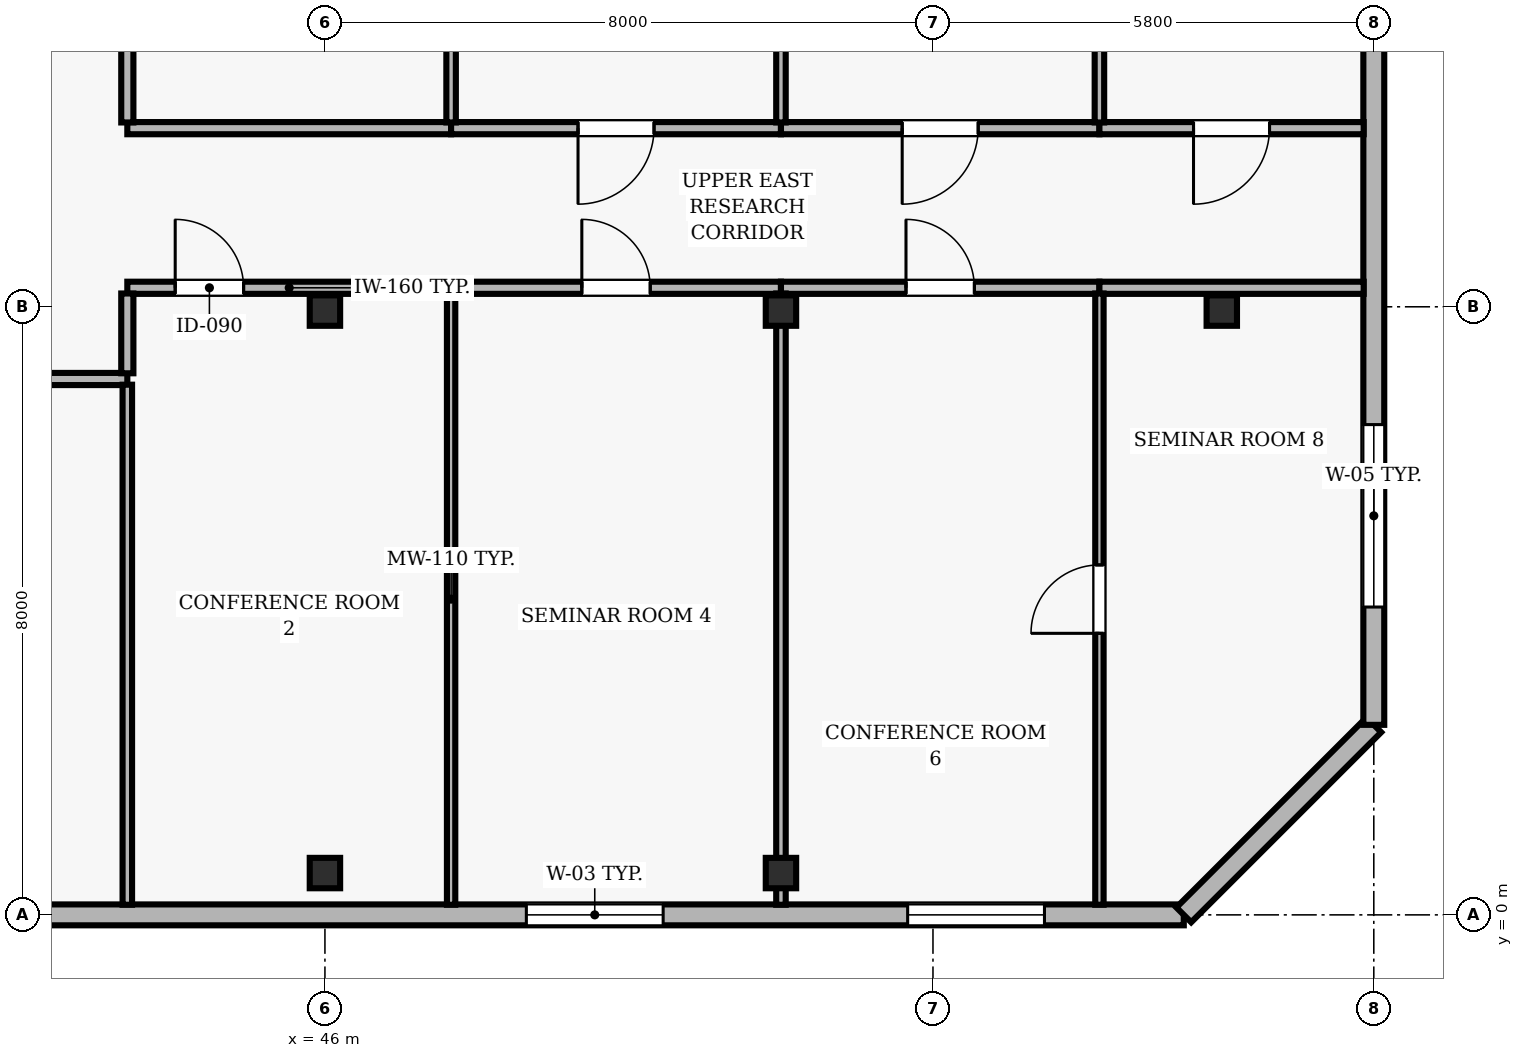
"""IFC4 building model, lengths in metres.
Left out: names, types, materials, properties, quantities, classifications, styles, units other than length and angle.
Written with IfcOpenShell. Run it as: python <this file> out.ifc"""

import sys

from ifc_helpers import new_model, si_unit, direction, frame, frame_2d, origin, origin_2d, place, context, subcontext, project, spatial, rectangle, hollow_rectangle, extrude, element, fill, save


model = new_model("IFC4")
c1 = context("Model", 3, precision=1e-05, world=origin(), true_north=direction((0.0, 1.0)))
c2 = subcontext(c1, "Body", "Model", "MODEL_VIEW")
j1 = project(units=[si_unit("LENGTHUNIT", "METRE"), si_unit("PLANEANGLEUNIT", "RADIAN")], contexts=[c1])
p1 = place(None, origin())
s1 = spatial("IfcSite", under=j1, at=p1, CompositionType="ELEMENT")
p2 = place(p1, origin())
s2 = spatial("IfcBuilding", under=s1, at=p2, CompositionType="ELEMENT")
p3 = place(p2, frame((0.0, 0.0, 302.8)))
s3 = spatial("IfcBuildingStorey", under=s2, at=p3, CompositionType="ELEMENT", Elevation=302.8)
for number, where, z_axis, x_axis in (
    (1, (46.0, 0.55, 0.0), (0.0, 0.0, 1.0), (1.0, 0.0, 0.0)),
    (2, (46.0, 7.95, 0.0), (0.0, 0.0, 1.0), (1.0, 0.0, 0.0)),
    (3, (52.0, 0.55, 0.0), (0.0, 0.0, 1.0), (1.0, 0.0, 0.0)),
    (4, (52.0, 7.95, 0.0), (0.0, 0.0, 1.0), (1.0, 0.0, 0.0)),
    (5, (57.8, 7.95, 0.0), (0.0, 0.0, 1.0), (1.0, 0.0, 0.0)),
):
    element("IfcColumn", number, at=place(p3, frame(where, z_axis=z_axis, x_axis=x_axis)), inside=s3, PredefinedType="COLUMN", context=c2, shape_type="SweptSolid", body=[
        extrude(hollow_rectangle(XDim=0.4, YDim=0.4, WallThickness=0.02, at=origin_2d()), origin(), (0.0, 0.0, 1.0), 3.9),
    ])
p4 = place(p3, frame((24.5, 0.0, 0.0), z_axis=(0.0, 0.0, 1.0), x_axis=(1.0, 0.0, 0.0)))
e6 = element("IfcWall", 6, at=p4, inside=s3, PredefinedType="SOLIDWALL", context=c2, shape_type="SweptSolid", body=[
    extrude(rectangle(XDim=32.8, YDim=0.275, at=frame_2d((16.4, 0.0))), origin(), (0.0, 0.0, 1.0), 3.64),
])
p5 = place(p4, frame((1.833, 0.0, 0.9)))
e7 = element("IfcOpeningElement", 7, at=p5, cuts=e6, PredefinedType="OPENING", context=c2, shape_type="SweptSolid", body=[
    extrude(rectangle(XDim=1.8, YDim=1.6, at=frame_2d((0.9, 0.8))), frame((0.0, 0.147, 0.0), z_axis=(0.0, -1.0, 0.0), x_axis=(1.0, 0.0, 0.0)), (0.0, 0.0, 1.0), 0.295),
])
p6 = place(p4, frame((8.2, 0.0, 0.9)))
e8 = element("IfcOpeningElement", 8, at=p6, cuts=e6, PredefinedType="OPENING", context=c2, shape_type="SweptSolid", body=[
    extrude(rectangle(XDim=1.8, YDim=1.6, at=frame_2d((0.9, 0.8))), frame((0.0, 0.147, 0.0), z_axis=(0.0, -1.0, 0.0), x_axis=(1.0, 0.0, 0.0)), (0.0, 0.0, 1.0), 0.295),
])
p7 = place(p4, frame((24.15, 0.0, 0.9)))
e9 = element("IfcOpeningElement", 9, at=p7, cuts=e6, PredefinedType="OPENING", context=c2, shape_type="SweptSolid", body=[
    extrude(rectangle(XDim=1.8, YDim=1.6, at=frame_2d((0.9, 0.8))), frame((0.0, 0.147, 0.0), z_axis=(0.0, -1.0, 0.0), x_axis=(1.0, 0.0, 0.0)), (0.0, 0.0, 1.0), 0.295),
])
p8 = place(p4, frame((29.167, 0.0, 0.9)))
e10 = element("IfcOpeningElement", 10, at=p8, cuts=e6, PredefinedType="OPENING", context=c2, shape_type="SweptSolid", body=[
    extrude(rectangle(XDim=1.8, YDim=1.6, at=frame_2d((0.9, 0.8))), frame((0.0, 0.147, 0.0), z_axis=(0.0, -1.0, 0.0), x_axis=(1.0, 0.0, 0.0)), (0.0, 0.0, 1.0), 0.295),
])
p9 = place(p3, frame((57.3, 0.0, 0.0), z_axis=(0.0, 0.0, 1.0), x_axis=(0.707106781187, 0.707106781187, 0.0)))
e11 = element("IfcWall", 11, at=p9, inside=s3, PredefinedType="SOLIDWALL", context=c2, shape_type="SweptSolid", body=[
    extrude(rectangle(XDim=3.536, YDim=0.275, at=frame_2d((1.768, 0.0))), origin(), (0.0, 0.0, 1.0), 3.64),
])
p10 = place(p3, frame((59.8, 2.5, 0.0), z_axis=(0.0, 0.0, 1.0), x_axis=(0.0, 1.0, 0.0)))
e12 = element("IfcWall", 12, at=p10, inside=s3, PredefinedType="SOLIDWALL", context=c2, shape_type="SweptSolid", body=[
    extrude(rectangle(XDim=11.0, YDim=0.275, at=frame_2d((5.5, 0.0))), origin(), (0.0, 0.0, 1.0), 3.64),
])
p11 = place(p10, frame((1.55, 0.0, 0.9)))
e13 = element("IfcOpeningElement", 13, at=p11, cuts=e12, PredefinedType="OPENING", context=c2, shape_type="SweptSolid", body=[
    extrude(rectangle(XDim=2.4, YDim=1.6, at=frame_2d((1.2, 0.8))), frame((0.0, 0.147, 0.0), z_axis=(0.0, -1.0, 0.0), x_axis=(1.0, 0.0, 0.0)), (0.0, 0.0, 1.0), 0.295),
])
p12 = place(p3, frame((38.05, 7.05, 0.0), z_axis=(0.0, 0.0, 1.0), x_axis=(1.0, 0.0, 0.0)))
e14 = element("IfcWall", 14, at=p12, inside=s3, PredefinedType="PARTITIONING", context=c2, shape_type="SweptSolid", body=[
    extrude(rectangle(XDim=5.35, YDim=0.16, at=frame_2d((2.675, 0.0))), origin(), (0.0, 0.0, 1.0), 3.64),
])
p13 = place(p12, frame((2.175, 0.0, 0.0)))
e15 = element("IfcOpeningElement", 15, at=p13, cuts=e14, PredefinedType="OPENING", context=c2, shape_type="SweptSolid", body=[
    extrude(rectangle(XDim=1.0, YDim=2.1, at=frame_2d((0.5, 1.05))), frame((0.0, 0.09, 0.0), z_axis=(0.0, -1.0, 0.0), x_axis=(1.0, 0.0, 0.0)), (0.0, 0.0, 1.0), 0.18),
])
p14 = place(p3, frame((43.4, 8.25, 0.0), z_axis=(0.0, 0.0, 1.0), x_axis=(1.0, 0.0, 0.0)))
e16 = element("IfcWall", 16, at=p14, inside=s3, PredefinedType="PARTITIONING", context=c2, shape_type="SweptSolid", body=[
    extrude(rectangle(XDim=4.26, YDim=0.16, at=frame_2d((2.13, 0.0))), origin(), (0.0, 0.0, 1.0), 3.171),
])
p15 = place(p14, frame((0.63, 0.0, 0.0)))
e17 = element("IfcOpeningElement", 17, at=p15, cuts=e16, PredefinedType="OPENING", context=c2, shape_type="SweptSolid", body=[
    extrude(rectangle(XDim=0.9, YDim=2.1, at=frame_2d((0.45, 1.05))), frame((0.0, 0.09, 0.0), z_axis=(0.0, -1.0, 0.0), x_axis=(1.0, 0.0, 0.0)), (0.0, 0.0, 1.0), 0.18),
])
p16 = place(p3, frame((47.66, 8.25, 0.0), z_axis=(0.0, 0.0, 1.0), x_axis=(1.0, 0.0, 0.0)))
e18 = element("IfcWall", 18, at=p16, inside=s3, PredefinedType="PARTITIONING", context=c2, shape_type="SweptSolid", body=[
    extrude(rectangle(XDim=4.34, YDim=0.16, at=frame_2d((2.17, 0.0))), origin(), (0.0, 0.0, 1.0), 3.171),
])
p17 = place(p16, frame((1.72, 0.0, 0.0)))
e19 = element("IfcOpeningElement", 19, at=p17, cuts=e18, PredefinedType="OPENING", context=c2, shape_type="SweptSolid", body=[
    extrude(rectangle(XDim=0.9, YDim=2.1, at=frame_2d((0.45, 1.05))), frame((0.0, 0.09, 0.0), z_axis=(0.0, -1.0, 0.0), x_axis=(1.0, 0.0, 0.0)), (0.0, 0.0, 1.0), 0.18),
])
p18 = place(p3, frame((47.66, 10.35, 0.0), z_axis=(0.0, 0.0, 1.0), x_axis=(-1.0, 0.0, 0.0)))
e20 = element("IfcWall", 20, at=p18, inside=s3, PredefinedType="PARTITIONING", context=c2, shape_type="SweptSolid", body=[
    extrude(rectangle(XDim=4.26, YDim=0.16, at=frame_2d((2.13, 0.0))), origin(), (0.0, 0.0, 1.0), 3.322),
])
p19 = place(p3, frame((52.0, 8.25, 0.0), z_axis=(0.0, 0.0, 1.0), x_axis=(1.0, 0.0, 0.0)))
e21 = element("IfcWall", 21, at=p19, inside=s3, PredefinedType="PARTITIONING", context=c2, shape_type="SweptSolid", body=[
    extrude(rectangle(XDim=4.19, YDim=0.16, at=frame_2d((2.095, 0.0))), origin(), (0.0, 0.0, 1.0), 3.171),
])
p20 = place(p19, frame((1.645, 0.0, 0.0)))
e22 = element("IfcOpeningElement", 22, at=p20, cuts=e21, PredefinedType="OPENING", context=c2, shape_type="SweptSolid", body=[
    extrude(rectangle(XDim=0.9, YDim=2.1, at=frame_2d((0.45, 1.05))), frame((0.0, 0.09, 0.0), z_axis=(0.0, -1.0, 0.0), x_axis=(1.0, 0.0, 0.0)), (0.0, 0.0, 1.0), 0.18),
])
p21 = place(p3, frame((52.0, 10.35, 0.0), z_axis=(0.0, 0.0, 1.0), x_axis=(-1.0, 0.0, 0.0)))
e23 = element("IfcWall", 23, at=p21, inside=s3, PredefinedType="PARTITIONING", context=c2, shape_type="SweptSolid", body=[
    extrude(rectangle(XDim=4.34, YDim=0.16, at=frame_2d((2.17, 0.0))), origin(), (0.0, 0.0, 1.0), 3.322),
])
p22 = place(p21, frame((1.67, 0.0, 0.0)))
e24 = element("IfcOpeningElement", 24, at=p22, cuts=e23, PredefinedType="OPENING", context=c2, shape_type="SweptSolid", body=[
    extrude(rectangle(XDim=1.0, YDim=2.1, at=frame_2d((0.5, 1.05))), frame((0.0, 0.09, 0.0), z_axis=(0.0, -1.0, 0.0), x_axis=(1.0, 0.0, 0.0)), (0.0, 0.0, 1.0), 0.18),
])
p23 = place(p3, frame((56.19, 8.25, 0.0), z_axis=(0.0, 0.0, 1.0), x_axis=(1.0, 0.0, 0.0)))
e25 = element("IfcWall", 25, at=p23, inside=s3, PredefinedType="PARTITIONING", context=c2, shape_type="SweptSolid", body=[
    extrude(rectangle(XDim=3.477, YDim=0.16, at=frame_2d((1.739, 0.0))), origin(), (0.0, 0.0, 1.0), 3.171),
])
p24 = place(p3, frame((56.19, 10.35, 0.0), z_axis=(0.0, 0.0, 1.0), x_axis=(-1.0, 0.0, 0.0)))
e26 = element("IfcWall", 26, at=p24, inside=s3, PredefinedType="PARTITIONING", context=c2, shape_type="SweptSolid", body=[
    extrude(rectangle(XDim=4.19, YDim=0.16, at=frame_2d((2.095, 0.0))), origin(), (0.0, 0.0, 1.0), 3.322),
])
p25 = place(p24, frame((1.595, 0.0, 0.0)))
e27 = element("IfcOpeningElement", 27, at=p25, cuts=e26, PredefinedType="OPENING", context=c2, shape_type="SweptSolid", body=[
    extrude(rectangle(XDim=1.0, YDim=2.1, at=frame_2d((0.5, 1.05))), frame((0.0, 0.09, 0.0), z_axis=(0.0, -1.0, 0.0), x_axis=(1.0, 0.0, 0.0)), (0.0, 0.0, 1.0), 0.18),
])
p26 = place(p3, frame((59.667, 10.35, 0.0), z_axis=(0.0, 0.0, 1.0), x_axis=(-1.0, 0.0, 0.0)))
e28 = element("IfcWall", 28, at=p26, inside=s3, PredefinedType="PARTITIONING", context=c2, shape_type="SweptSolid", body=[
    extrude(rectangle(XDim=3.477, YDim=0.16, at=frame_2d((1.739, 0.0))), origin(), (0.0, 0.0, 1.0), 3.322),
])
p27 = place(p26, frame((1.239, 0.0, 0.0)))
e29 = element("IfcOpeningElement", 29, at=p27, cuts=e28, PredefinedType="OPENING", context=c2, shape_type="SweptSolid", body=[
    extrude(rectangle(XDim=1.0, YDim=2.1, at=frame_2d((0.5, 1.05))), frame((0.0, 0.09, 0.0), z_axis=(0.0, -1.0, 0.0), x_axis=(1.0, 0.0, 0.0)), (0.0, 0.0, 1.0), 0.18),
])
p28 = place(p3, frame((43.4, 0.133, 0.0), z_axis=(0.0, 0.0, 1.0), x_axis=(0.0, 1.0, 0.0)))
e30 = element("IfcWall", 30, at=p28, inside=s3, PredefinedType="PARTITIONING", context=c2, shape_type="SweptSolid", body=[
    extrude(rectangle(XDim=6.842, YDim=0.125, at=frame_2d((3.421, 0.0))), origin(), (0.0, 0.0, 1.0), 3.64),
])
p29 = place(p3, frame((43.4, 7.125, 0.0), z_axis=(0.0, 0.0, 1.0), x_axis=(0.0, 1.0, 0.0)))
e31 = element("IfcWall", 31, at=p29, inside=s3, PredefinedType="PARTITIONING", context=c2, shape_type="SweptSolid", body=[
    extrude(rectangle(XDim=1.05, YDim=0.16, at=frame_2d((0.525, 0.0))), origin(), (0.0, 0.0, 1.0), 3.64),
])
p30 = place(p3, frame((43.4, 10.425, 0.0), z_axis=(0.0, 0.0, 1.0), x_axis=(0.0, 1.0, 0.0)))
e32 = element("IfcWall", 32, at=p30, inside=s3, PredefinedType="PARTITIONING", context=c2, shape_type="SweptSolid", body=[
    extrude(rectangle(XDim=5.5, YDim=0.16, at=frame_2d((2.75, 0.0))), origin(), (0.0, 0.0, 1.0), 3.64),
])
p31 = place(p30, frame((2.25, 0.0, 0.0)))
e33 = element("IfcOpeningElement", 33, at=p31, cuts=e32, PredefinedType="OPENING", context=c2, shape_type="SweptSolid", body=[
    extrude(rectangle(XDim=1.0, YDim=2.1, at=frame_2d((0.5, 1.05))), frame((0.0, 0.09, 0.0), z_axis=(0.0, -1.0, 0.0), x_axis=(1.0, 0.0, 0.0)), (0.0, 0.0, 1.0), 0.18),
])
p32 = place(p3, frame((47.66, 0.133, 0.0), z_axis=(0.0, 0.0, 1.0), x_axis=(0.0, 1.0, 0.0)))
e34 = element("IfcWall", 34, at=p32, inside=s3, PredefinedType="MOVABLE", context=c2, shape_type="SweptSolid", body=[
    extrude(rectangle(XDim=8.042, YDim=0.11, at=frame_2d((4.021, 0.0))), origin(), (0.0, 0.0, 1.0), 3.64),
])
p33 = place(p3, frame((47.66, 10.425, 0.0), z_axis=(0.0, 0.0, 1.0), x_axis=(0.0, 1.0, 0.0)))
e35 = element("IfcWall", 35, at=p33, inside=s3, PredefinedType="PARTITIONING", context=c2, shape_type="SweptSolid", body=[
    extrude(rectangle(XDim=5.442, YDim=0.125, at=frame_2d((2.721, 0.0))), origin(), (0.0, 0.0, 1.0), 3.64),
])
p34 = place(p3, frame((52.0, 0.133, 0.0), z_axis=(0.0, 0.0, 1.0), x_axis=(0.0, 1.0, 0.0)))
e36 = element("IfcWall", 36, at=p34, inside=s3, PredefinedType="PARTITIONING", context=c2, shape_type="SweptSolid", body=[
    extrude(rectangle(XDim=8.042, YDim=0.125, at=frame_2d((4.021, 0.0))), origin(), (0.0, 0.0, 1.0), 3.171),
])
p35 = place(p3, frame((52.0, 10.425, 0.0), z_axis=(0.0, 0.0, 1.0), x_axis=(0.0, 1.0, 0.0)))
e37 = element("IfcWall", 37, at=p35, inside=s3, PredefinedType="PARTITIONING", context=c2, shape_type="SweptSolid", body=[
    extrude(rectangle(XDim=5.442, YDim=0.125, at=frame_2d((2.721, 0.0))), origin(), (0.0, 0.0, 1.0), 3.171),
])
p36 = place(p3, frame((56.19, 0.133, 0.0), z_axis=(0.0, 0.0, 1.0), x_axis=(0.0, 1.0, 0.0)))
e38 = element("IfcWall", 38, at=p36, inside=s3, PredefinedType="MOVABLE", context=c2, shape_type="SweptSolid", body=[
    extrude(rectangle(XDim=8.042, YDim=0.11, at=frame_2d((4.021, 0.0))), origin(), (0.0, 0.0, 1.0), 3.64),
])
p37 = place(p36, frame((3.571, 0.0, 0.0)))
e39 = element("IfcOpeningElement", 39, at=p37, cuts=e38, PredefinedType="OPENING", context=c2, shape_type="SweptSolid", body=[
    extrude(rectangle(XDim=0.9, YDim=2.1, at=frame_2d((0.45, 1.05))), frame((0.0, 0.065, 0.0), z_axis=(0.0, -1.0, 0.0), x_axis=(1.0, 0.0, 0.0)), (0.0, 0.0, 1.0), 0.13),
])
p38 = place(p3, frame((56.19, 10.425, 0.0), z_axis=(0.0, 0.0, 1.0), x_axis=(0.0, 1.0, 0.0)))
e40 = element("IfcWall", 40, at=p38, inside=s3, PredefinedType="PARTITIONING", context=c2, shape_type="SweptSolid", body=[
    extrude(rectangle(XDim=5.442, YDim=0.125, at=frame_2d((2.721, 0.0))), origin(), (0.0, 0.0, 1.0), 3.64),
])
p39 = place(p7, origin())
e41 = element("IfcWindow", 41, at=p39, inside=s3, PartitioningType="SINGLE_PANEL", PredefinedType="WINDOW", context=c2, shape_type="SweptSolid", body=[
    extrude(rectangle(XDim=1.8, YDim=1.6, at=frame_2d((0.9, 0.8))), frame((0.0, 0.03, 0.0), z_axis=(0.0, -1.0, 0.0), x_axis=(1.0, 0.0, 0.0)), (0.0, 0.0, 1.0), 0.06),
])
fill(e9, e41)
p40 = place(p8, origin())
e42 = element("IfcWindow", 42, at=p40, inside=s3, PartitioningType="SINGLE_PANEL", PredefinedType="WINDOW", context=c2, shape_type="SweptSolid", body=[
    extrude(rectangle(XDim=1.8, YDim=1.6, at=frame_2d((0.9, 0.8))), frame((0.0, 0.03, 0.0), z_axis=(0.0, -1.0, 0.0), x_axis=(1.0, 0.0, 0.0)), (0.0, 0.0, 1.0), 0.06),
])
fill(e10, e42)
p41 = place(p11, origin())
e43 = element("IfcWindow", 43, at=p41, inside=s3, PartitioningType="SINGLE_PANEL", PredefinedType="WINDOW", context=c2, shape_type="SweptSolid", body=[
    extrude(rectangle(XDim=2.4, YDim=1.6, at=frame_2d((1.2, 0.8))), frame((0.0, 0.03, 0.0), z_axis=(0.0, -1.0, 0.0), x_axis=(1.0, 0.0, 0.0)), (0.0, 0.0, 1.0), 0.06),
])
fill(e13, e43)
p42 = place(p15, origin())
e44 = element("IfcDoor", 44, at=p42, inside=s3, OperationType="SINGLE_SWING_LEFT", PredefinedType="DOOR", context=c2, shape_type="SweptSolid", body=[
    extrude(rectangle(XDim=0.9, YDim=2.1, at=frame_2d((0.45, 1.05))), frame((0.0, 0.025, 0.0), z_axis=(0.0, -1.0, 0.0), x_axis=(1.0, 0.0, 0.0)), (0.0, 0.0, 1.0), 0.05),
])
fill(e17, e44)
p43 = place(p17, origin())
e45 = element("IfcDoor", 45, at=p43, inside=s3, OperationType="SINGLE_SWING_LEFT", PredefinedType="DOOR", context=c2, shape_type="SweptSolid", body=[
    extrude(rectangle(XDim=0.9, YDim=2.1, at=frame_2d((0.45, 1.05))), frame((0.0, 0.025, 0.0), z_axis=(0.0, -1.0, 0.0), x_axis=(1.0, 0.0, 0.0)), (0.0, 0.0, 1.0), 0.05),
])
fill(e19, e45)
p44 = place(p22, origin())
e46 = element("IfcDoor", 46, at=p44, inside=s3, OperationType="SINGLE_SWING_RIGHT", PredefinedType="DOOR", context=c2, shape_type="SweptSolid", body=[
    extrude(rectangle(XDim=1.0, YDim=2.1, at=frame_2d((0.5, 1.05))), frame((0.0, 0.025, 0.0), z_axis=(0.0, -1.0, 0.0), x_axis=(1.0, 0.0, 0.0)), (0.0, 0.0, 1.0), 0.05),
])
fill(e24, e46)
p45 = place(p20, origin())
e47 = element("IfcDoor", 47, at=p45, inside=s3, OperationType="SINGLE_SWING_LEFT", PredefinedType="DOOR", context=c2, shape_type="SweptSolid", body=[
    extrude(rectangle(XDim=0.9, YDim=2.1, at=frame_2d((0.45, 1.05))), frame((0.0, 0.025, 0.0), z_axis=(0.0, -1.0, 0.0), x_axis=(1.0, 0.0, 0.0)), (0.0, 0.0, 1.0), 0.05),
])
fill(e22, e47)
p46 = place(p25, origin())
e48 = element("IfcDoor", 48, at=p46, inside=s3, OperationType="SINGLE_SWING_RIGHT", PredefinedType="DOOR", context=c2, shape_type="SweptSolid", body=[
    extrude(rectangle(XDim=1.0, YDim=2.1, at=frame_2d((0.5, 1.05))), frame((0.0, 0.025, 0.0), z_axis=(0.0, -1.0, 0.0), x_axis=(1.0, 0.0, 0.0)), (0.0, 0.0, 1.0), 0.05),
])
fill(e27, e48)
p47 = place(p37, origin())
e49 = element("IfcDoor", 49, at=p47, inside=s3, OperationType="SINGLE_SWING_LEFT", PredefinedType="DOOR", context=c2, shape_type="SweptSolid", body=[
    extrude(rectangle(XDim=0.9, YDim=2.1, at=frame_2d((0.45, 1.05))), frame((0.0, 0.025, 0.0), z_axis=(0.0, -1.0, 0.0), x_axis=(1.0, 0.0, 0.0)), (0.0, 0.0, 1.0), 0.05),
])
fill(e39, e49)
p48 = place(p27, origin())
e50 = element("IfcDoor", 50, at=p48, inside=s3, OperationType="SINGLE_SWING_RIGHT", PredefinedType="DOOR", context=c2, shape_type="SweptSolid", body=[
    extrude(rectangle(XDim=1.0, YDim=2.1, at=frame_2d((0.5, 1.05))), frame((0.0, 0.025, 0.0), z_axis=(0.0, -1.0, 0.0), x_axis=(1.0, 0.0, 0.0)), (0.0, 0.0, 1.0), 0.05),
])
fill(e29, e50)
save(model, sys.argv[1])
